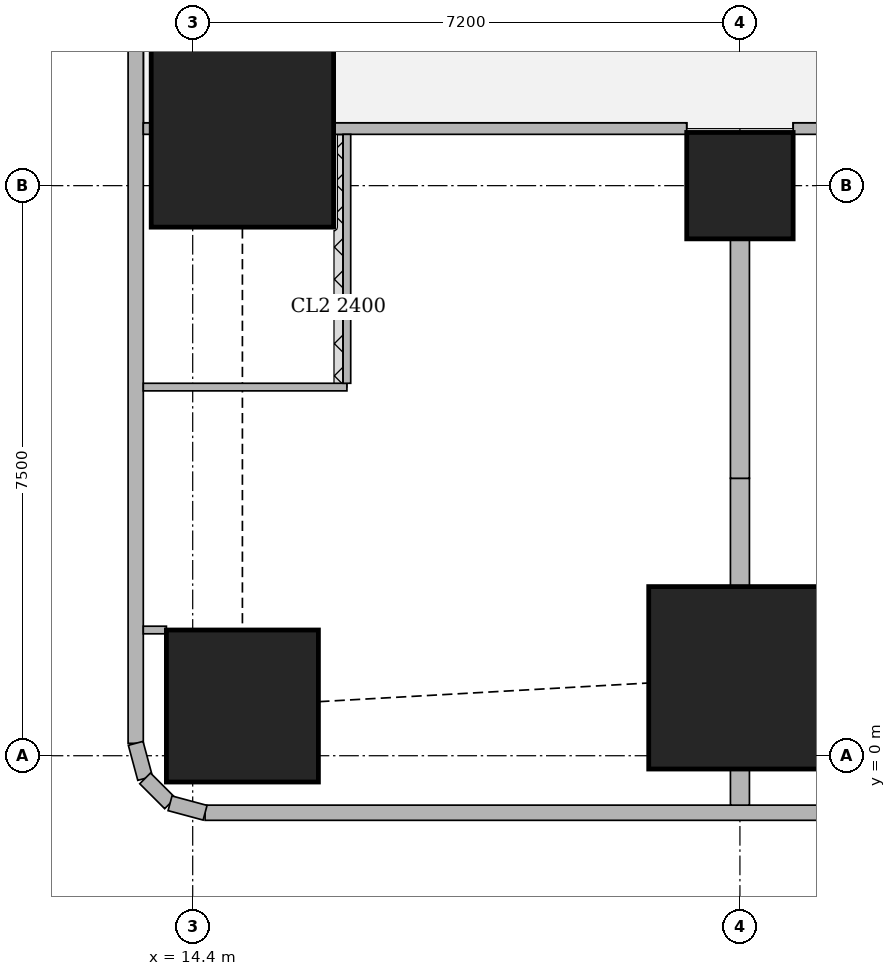
"""IFC4 building model, lengths in metres.
Left out: names, types, materials, properties, quantities, classifications, styles, units other than length and angle.
Written with IfcOpenShell. Run it as: python <this file> out.ifc"""

import sys

from ifc_helpers import new_model, si_unit, direction, frame, frame_2d, origin, origin_2d, place, context, subcontext, project, spatial, rectangle, extrude, element, fill, save


model = new_model("IFC4")
c1 = context("Model", 3, precision=1e-05, world=origin(), true_north=direction((0.0, 1.0)))
c2 = subcontext(c1, "Body", "Model", "MODEL_VIEW")
j1 = project(units=[si_unit("LENGTHUNIT", "METRE"), si_unit("PLANEANGLEUNIT", "RADIAN")], contexts=[c1])
p1 = place(None, origin())
s1 = spatial("IfcSite", under=j1, at=p1, CompositionType="ELEMENT")
p2 = place(p1, origin())
s2 = spatial("IfcBuilding", under=s1, at=p2, CompositionType="ELEMENT")
p3 = place(p2, frame((0.0, 0.0, 234.95)))
s3 = spatial("IfcBuildingStorey", under=s2, at=p3, CompositionType="ELEMENT", Elevation=234.95)
p4 = place(p3, frame((15.054, 0.654, 0.0), z_axis=(0.0, 0.0, 1.0), x_axis=(1.0, 0.0, 0.0)))
e1 = element("IfcColumn", 1, at=p4, inside=s3, PredefinedType="COLUMN", context=c2, shape_type="SweptSolid", body=[
    extrude(rectangle(XDim=2.0, YDim=2.0, at=origin_2d()), origin(), (0.0, 0.0, 1.0), 3.75),
])
for number, where, z_axis, x_axis in (
    (2, (21.6, 1.025, 0.0), (0.0, 0.0, 1.0), (1.0, 0.0, 0.0)),
    (3, (15.054, 8.154, 0.0), (0.0, 0.0, 1.0), (1.0, 0.0, 0.0)),
):
    element("IfcColumn", number, at=place(p3, frame(where, z_axis=z_axis, x_axis=x_axis)), inside=s3, PredefinedType="COLUMN", context=c2, shape_type="SweptSolid", body=[
        extrude(rectangle(XDim=2.4, YDim=2.4, at=origin_2d()), origin(), (0.0, 0.0, 1.0), 3.75),
    ])
p5 = place(p3, frame((21.6, 7.5, 0.0), z_axis=(0.0, 0.0, 1.0), x_axis=(1.0, 0.0, 0.0)))
e4 = element("IfcColumn", 4, at=p5, inside=s3, PredefinedType="COLUMN", context=c2, shape_type="SweptSolid", body=[
    extrude(rectangle(XDim=1.4, YDim=1.4, at=origin_2d()), origin(), (0.0, 0.0, 1.0), 3.75),
])
p6 = place(p3, frame((14.563, -0.75, 0.0), z_axis=(0.0, 0.0, 1.0), x_axis=(1.0, 0.0, 0.0)))
e5 = element("IfcWall", 5, at=p6, inside=s3, PredefinedType="SOLIDWALL", context=c2, shape_type="SweptSolid", body=[
    extrude(rectangle(XDim=33.228, YDim=0.2, at=frame_2d((16.614, 0.0))), origin(), (0.0, 0.0, 1.0), 3.5),
])
p7 = place(p6, frame((2.319, 0.0, 0.9)))
e6 = element("IfcOpeningElement", 6, at=p7, cuts=e5, PredefinedType="OPENING", context=c2, shape_type="SweptSolid", body=[
    extrude(rectangle(XDim=2.4, YDim=1.5, at=frame_2d((1.2, 0.75))), frame((0.0, 0.11, 0.0), z_axis=(0.0, -1.0, 0.0), x_axis=(1.0, 0.0, 0.0)), (0.0, 0.0, 1.0), 0.22),
])
p8 = place(p6, frame((7.937, 0.0, 0.9)))
e7 = element("IfcOpeningElement", 7, at=p8, cuts=e5, PredefinedType="OPENING", context=c2, shape_type="SweptSolid", body=[
    extrude(rectangle(XDim=1.8, YDim=1.5, at=frame_2d((0.9, 0.75))), frame((0.0, 0.11, 0.0), z_axis=(0.0, -1.0, 0.0), x_axis=(1.0, 0.0, 0.0)), (0.0, 0.0, 1.0), 0.22),
])
p9 = place(p6, frame((11.537, 0.0, 0.9)))
e8 = element("IfcOpeningElement", 8, at=p9, cuts=e5, PredefinedType="OPENING", context=c2, shape_type="SweptSolid", body=[
    extrude(rectangle(XDim=1.8, YDim=1.5, at=frame_2d((0.9, 0.75))), frame((0.0, 0.11, 0.0), z_axis=(0.0, -1.0, 0.0), x_axis=(1.0, 0.0, 0.0)), (0.0, 0.0, 1.0), 0.22),
])
p10 = place(p6, frame((15.137, 0.0, 0.9)))
e9 = element("IfcOpeningElement", 9, at=p10, cuts=e5, PredefinedType="OPENING", context=c2, shape_type="SweptSolid", body=[
    extrude(rectangle(XDim=1.8, YDim=1.5, at=frame_2d((0.9, 0.75))), frame((0.0, 0.11, 0.0), z_axis=(0.0, -1.0, 0.0), x_axis=(1.0, 0.0, 0.0)), (0.0, 0.0, 1.0), 0.22),
])
p11 = place(p6, frame((18.737, 0.0, 0.9)))
e10 = element("IfcOpeningElement", 10, at=p11, cuts=e5, PredefinedType="OPENING", context=c2, shape_type="SweptSolid", body=[
    extrude(rectangle(XDim=1.8, YDim=1.5, at=frame_2d((0.9, 0.75))), frame((0.0, 0.11, 0.0), z_axis=(0.0, -1.0, 0.0), x_axis=(1.0, 0.0, 0.0)), (0.0, 0.0, 1.0), 0.22),
])
p12 = place(p6, frame((22.337, 0.0, 0.9)))
e11 = element("IfcOpeningElement", 11, at=p12, cuts=e5, PredefinedType="OPENING", context=c2, shape_type="SweptSolid", body=[
    extrude(rectangle(XDim=1.8, YDim=1.5, at=frame_2d((0.9, 0.75))), frame((0.0, 0.11, 0.0), z_axis=(0.0, -1.0, 0.0), x_axis=(1.0, 0.0, 0.0)), (0.0, 0.0, 1.0), 0.22),
])
p13 = place(p6, frame((25.937, 0.0, 0.9)))
e12 = element("IfcOpeningElement", 12, at=p13, cuts=e5, PredefinedType="OPENING", context=c2, shape_type="SweptSolid", body=[
    extrude(rectangle(XDim=1.8, YDim=1.5, at=frame_2d((0.9, 0.75))), frame((0.0, 0.11, 0.0), z_axis=(0.0, -1.0, 0.0), x_axis=(1.0, 0.0, 0.0)), (0.0, 0.0, 1.0), 0.22),
])
p14 = place(p3, frame((13.65, 44.837, 0.0), z_axis=(0.0, 0.0, 1.0), x_axis=(0.0, -1.0, 0.0)))
e13 = element("IfcWall", 13, at=p14, inside=s3, PredefinedType="SOLIDWALL", context=c2, shape_type="SweptSolid", body=[
    extrude(rectangle(XDim=44.674, YDim=0.2, at=frame_2d((22.337, 0.0))), origin(), (0.0, 0.0, 1.0), 3.5),
])
p15 = place(p14, frame((1.889, 0.0, 0.9)))
e14 = element("IfcOpeningElement", 14, at=p15, cuts=e13, PredefinedType="OPENING", context=c2, shape_type="SweptSolid", body=[
    extrude(rectangle(XDim=2.4, YDim=1.5, at=frame_2d((1.2, 0.75))), frame((0.0, 0.11, 0.0), z_axis=(0.0, -1.0, 0.0), x_axis=(1.0, 0.0, 0.0)), (0.0, 0.0, 1.0), 0.22),
])
p16 = place(p14, frame((40.385, 0.0, 0.9)))
e15 = element("IfcOpeningElement", 15, at=p16, cuts=e13, PredefinedType="OPENING", context=c2, shape_type="SweptSolid", body=[
    extrude(rectangle(XDim=2.4, YDim=1.5, at=frame_2d((1.2, 0.75))), frame((0.0, 0.11, 0.0), z_axis=(0.0, -1.0, 0.0), x_axis=(1.0, 0.0, 0.0)), (0.0, 0.0, 1.0), 0.22),
])
p17 = place(p3, frame((13.65, 0.163, 0.0), z_axis=(0.0, 0.0, 1.0), x_axis=(0.259698463175, -0.965689757751, 0.0)))
e16 = element("IfcWall", 16, at=p17, inside=s3, PredefinedType="SOLIDWALL", context=c2, shape_type="SweptSolid", body=[
    extrude(rectangle(XDim=0.478, YDim=0.2, at=frame_2d((0.239, 0.0))), origin(), (0.0, 0.0, 1.0), 3.5),
])
p18 = place(p3, frame((13.774, -0.298, 0.0), z_axis=(0.0, 0.0, 1.0), x_axis=(0.707369890659, -0.706843573776, 0.0)))
e17 = element("IfcWall", 17, at=p18, inside=s3, PredefinedType="SOLIDWALL", context=c2, shape_type="SweptSolid", body=[
    extrude(rectangle(XDim=0.464, YDim=0.2, at=frame_2d((0.232, 0.0))), origin(), (0.0, 0.0, 1.0), 3.5),
])
p19 = place(p3, frame((14.102, -0.626, 0.0), z_axis=(0.0, 0.0, 1.0), x_axis=(0.965655254015, -0.259826731483, 0.0)))
e18 = element("IfcWall", 18, at=p19, inside=s3, PredefinedType="SOLIDWALL", context=c2, shape_type="SweptSolid", body=[
    extrude(rectangle(XDim=0.477, YDim=0.2, at=frame_2d((0.239, 0.0))), origin(), (0.0, 0.0, 1.0), 3.5),
])
p20 = place(p3, frame((28.099, 8.25, 0.0), z_axis=(0.0, 0.0, 1.0), x_axis=(-1.0, 0.0, 0.0)))
e19 = element("IfcWall", 19, at=p20, inside=s3, PredefinedType="SOLIDWALL", context=c2, shape_type="SweptSolid", body=[
    extrude(rectangle(XDim=5.798, YDim=0.15, at=frame_2d((2.899, 0.0))), origin(), (0.0, 0.0, 1.0), 3.5),
])
p21 = place(p20, frame((3.999, 0.0, 0.0)))
e20 = element("IfcOpeningElement", 20, at=p21, cuts=e19, PredefinedType="OPENING", context=c2, shape_type="SweptSolid", body=[
    extrude(rectangle(XDim=1.0, YDim=2.1, at=frame_2d((0.5, 1.05))), frame((0.0, 0.085, 0.0), z_axis=(0.0, -1.0, 0.0), x_axis=(1.0, 0.0, 0.0)), (0.0, 0.0, 1.0), 0.17),
])
p22 = place(p3, frame((20.899, 8.25, 0.0), z_axis=(0.0, 0.0, 1.0), x_axis=(-1.0, 0.0, 0.0)))
e21 = element("IfcWall", 21, at=p22, inside=s3, PredefinedType="SOLIDWALL", context=c2, shape_type="SweptSolid", body=[
    extrude(rectangle(XDim=4.644, YDim=0.15, at=frame_2d((2.322, 0.0))), origin(), (0.0, 0.0, 1.0), 3.5),
])
p23 = place(p22, frame((3.27, 0.0, 0.0)))
e22 = element("IfcOpeningElement", 22, at=p23, cuts=e21, PredefinedType="OPENING", context=c2, shape_type="SweptSolid", body=[
    extrude(rectangle(XDim=1.0, YDim=2.1, at=frame_2d((0.5, 1.05))), frame((0.0, 0.085, 0.0), z_axis=(0.0, -1.0, 0.0), x_axis=(1.0, 0.0, 0.0)), (0.0, 0.0, 1.0), 0.17),
])
p24 = place(p3, frame((13.853, 8.25, 0.0), z_axis=(0.0, 0.0, 1.0), x_axis=(-1.0, 0.0, 0.0)))
e23 = element("IfcWall", 23, at=p24, inside=s3, PredefinedType="SOLIDWALL", context=c2, shape_type="SweptSolid", body=[
    extrude(rectangle(XDim=0.103, YDim=0.15, at=frame_2d((0.052, 0.0))), origin(), (0.0, 0.0, 1.0), 3.5),
])
p25 = place(p3, frame((13.75, 1.654, 0.0), z_axis=(0.0, 0.0, 1.0), x_axis=(1.0, 0.0, 0.0)))
e24 = element("IfcWall", 24, at=p25, inside=s3, PredefinedType="PARTITIONING", context=c2, shape_type="SweptSolid", body=[
    extrude(rectangle(XDim=0.304, YDim=0.1, at=frame_2d((0.152, 0.0))), origin(), (0.0, 0.0, 1.0), 2.05),
])
p26 = place(p3, frame((16.429, 4.85, 0.0), z_axis=(0.0, 0.0, 1.0), x_axis=(-1.0, 0.0, 0.0)))
e25 = element("IfcWall", 25, at=p26, inside=s3, PredefinedType="PARTITIONING", context=c2, shape_type="SweptSolid", body=[
    extrude(rectangle(XDim=2.679, YDim=0.1, at=frame_2d((1.339, 0.0))), origin(), (0.0, 0.0, 1.0), 2.05),
])
p27 = place(p3, frame((16.429, 4.9, 0.0), z_axis=(0.0, 0.0, 1.0), x_axis=(0.0, 1.0, 0.0)))
e26 = element("IfcWall", 26, at=p27, inside=s3, PredefinedType="PARTITIONING", context=c2, shape_type="SweptSolid", body=[
    extrude(rectangle(XDim=3.275, YDim=0.1, at=frame_2d((1.638, 0.0))), origin(), (0.0, 0.0, 1.0), 3.5),
])
p28 = place(p27, frame((0.6, 0.0, 0.0)))
e27 = element("IfcOpeningElement", 27, at=p28, cuts=e26, PredefinedType="OPENING", context=c2, shape_type="SweptSolid", body=[
    extrude(rectangle(XDim=0.9, YDim=2.1, at=frame_2d((0.45, 1.05))), frame((0.0, 0.06, 0.0), z_axis=(0.0, -1.0, 0.0), x_axis=(1.0, 0.0, 0.0)), (0.0, 0.0, 1.0), 0.12),
])
p29 = place(p3, frame((21.6, -0.65, 0.0), z_axis=(0.0, 0.0, 1.0), x_axis=(0.0, 1.0, 0.0)))
e28 = element("IfcWall", 28, at=p29, inside=s3, PredefinedType="SOLIDWALL", context=c2, shape_type="SweptSolid", body=[
    extrude(rectangle(XDim=0.474, YDim=0.25, at=frame_2d((0.237, 0.0))), origin(), (0.0, 0.0, 1.0), 2.05),
])
p30 = place(p3, frame((21.6, 2.226, 0.0), z_axis=(0.0, 0.0, 1.0), x_axis=(0.0, 1.0, 0.0)))
e29 = element("IfcWall", 29, at=p30, inside=s3, PredefinedType="SOLIDWALL", context=c2, shape_type="SweptSolid", body=[
    extrude(rectangle(XDim=1.424, YDim=0.25, at=frame_2d((0.712, 0.0))), origin(), (0.0, 0.0, 1.0), 2.05),
])
p31 = place(p3, frame((21.6, 3.65, 0.0), z_axis=(0.0, 0.0, 1.0), x_axis=(0.0, 1.0, 0.0)))
e30 = element("IfcWall", 30, at=p31, inside=s3, PredefinedType="SOLIDWALL", context=c2, shape_type="SweptSolid", body=[
    extrude(rectangle(XDim=3.149, YDim=0.25, at=frame_2d((1.575, 0.0))), origin(), (0.0, 0.0, 1.0), 3.5),
])
p32 = place(p7, origin())
e31 = element("IfcWindow", 31, at=p32, inside=s3, PartitioningType="SINGLE_PANEL", PredefinedType="WINDOW", context=c2, shape_type="SweptSolid", body=[
    extrude(rectangle(XDim=2.4, YDim=1.5, at=frame_2d((1.2, 0.75))), frame((0.0, 0.03, 0.0), z_axis=(0.0, -1.0, 0.0), x_axis=(1.0, 0.0, 0.0)), (0.0, 0.0, 1.0), 0.06),
])
fill(e6, e31)
p33 = place(p8, origin())
e32 = element("IfcWindow", 32, at=p33, inside=s3, PartitioningType="SINGLE_PANEL", PredefinedType="WINDOW", context=c2, shape_type="SweptSolid", body=[
    extrude(rectangle(XDim=1.8, YDim=1.5, at=frame_2d((0.9, 0.75))), frame((0.0, 0.03, 0.0), z_axis=(0.0, -1.0, 0.0), x_axis=(1.0, 0.0, 0.0)), (0.0, 0.0, 1.0), 0.06),
])
fill(e7, e32)
p34 = place(p16, origin())
e33 = element("IfcWindow", 33, at=p34, inside=s3, PartitioningType="SINGLE_PANEL", PredefinedType="WINDOW", context=c2, shape_type="SweptSolid", body=[
    extrude(rectangle(XDim=2.4, YDim=1.5, at=frame_2d((1.2, 0.75))), frame((0.0, 0.03, 0.0), z_axis=(0.0, -1.0, 0.0), x_axis=(1.0, 0.0, 0.0)), (0.0, 0.0, 1.0), 0.06),
])
fill(e15, e33)
p35 = place(p28, origin())
e34 = element("IfcDoor", 34, at=p35, inside=s3, OperationType="SINGLE_SWING_RIGHT", PredefinedType="DOOR", context=c2, shape_type="SweptSolid", body=[
    extrude(rectangle(XDim=0.9, YDim=2.1, at=frame_2d((0.45, 1.05))), frame((0.0, 0.025, 0.0), z_axis=(0.0, -1.0, 0.0), x_axis=(1.0, 0.0, 0.0)), (0.0, 0.0, 1.0), 0.05),
])
fill(e27, e34)
p36 = place(p23, origin())
e35 = element("IfcDoor", 35, at=p36, inside=s3, OperationType="SINGLE_SWING_LEFT", PredefinedType="DOOR", context=c2, shape_type="SweptSolid", body=[
    extrude(rectangle(XDim=1.0, YDim=2.1, at=frame_2d((0.5, 1.05))), frame((0.0, 0.025, 0.0), z_axis=(0.0, -1.0, 0.0), x_axis=(1.0, 0.0, 0.0)), (0.0, 0.0, 1.0), 0.05),
])
fill(e22, e35)
save(model, sys.argv[1])
